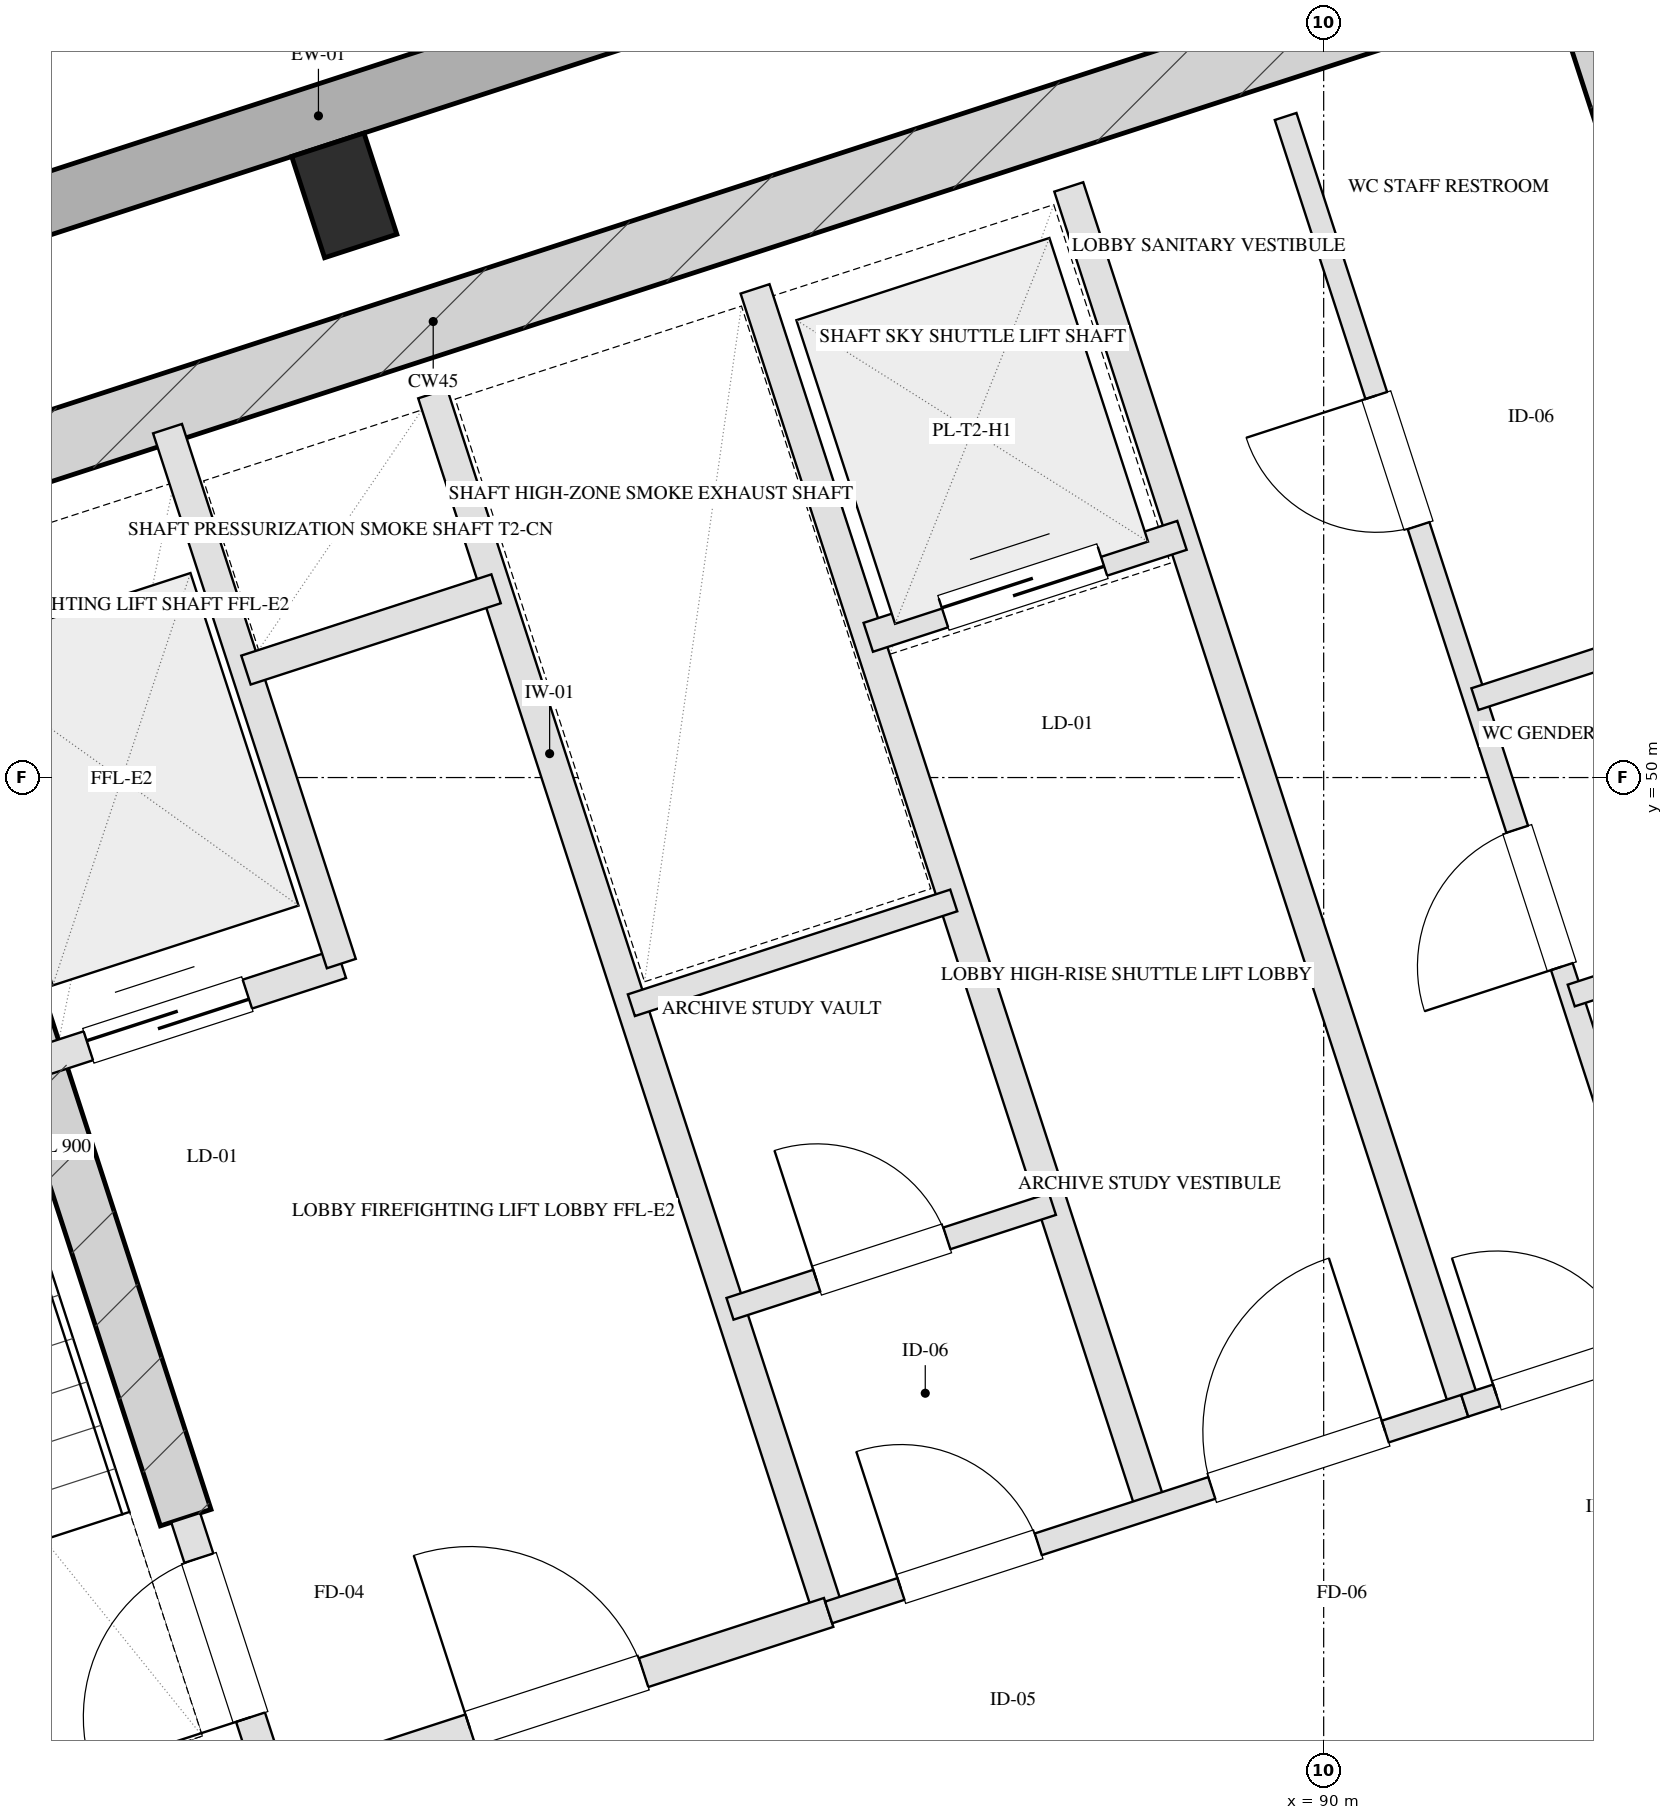
"""IFC4 building model, lengths in metres.
Left out: names, types, materials, properties, quantities, classifications, styles, units other than length and angle.
Written with IfcOpenShell. Run it as: python <this file> out.ifc"""

import sys

from ifc_helpers import new_model, si_unit, direction, frame, frame_2d, origin, origin_2d, place, context, subcontext, project, spatial, rectangle, hollow_rectangle, extrude, element, fill, save


model = new_model("IFC4")
c1 = context("Model", 3, precision=1e-05, world=origin(), true_north=direction((0.0, 1.0)))
c2 = subcontext(c1, "Body", "Model", "MODEL_VIEW")
j1 = project(units=[si_unit("LENGTHUNIT", "METRE"), si_unit("PLANEANGLEUNIT", "RADIAN")], contexts=[c1])
p1 = place(None, origin())
s1 = spatial("IfcSite", under=j1, at=p1, CompositionType="ELEMENT")
p2 = place(p1, origin())
s2 = spatial("IfcBuilding", under=s1, at=p2, CompositionType="ELEMENT")
p3 = place(p2, frame((0.0, 0.0, 223.1)))
s3 = spatial("IfcBuildingStorey", under=s2, at=p3, CompositionType="ELEMENT", Elevation=223.1)
p4 = place(p3, frame((76.415, 50.489, 0.0), z_axis=(0.0, 0.0, 1.0), x_axis=(0.951056810414, 0.309016089169, 0.0)))
e1 = element("IfcWall", 1, at=p4, inside=s3, PredefinedType="SHEAR", context=c2, shape_type="SweptSolid", body=[
    extrude(rectangle(XDim=16.25, YDim=0.45, at=frame_2d((8.125, 0.0))), origin(), (0.0, 0.0, 1.0), 3.45),
])
p5 = place(p3, frame((94.469, 46.781, 0.0), z_axis=(0.0, 0.0, 1.0), x_axis=(-0.309004419953, 0.951060601881, 0.0)))
e2 = element("IfcWall", 2, at=p5, inside=s3, PredefinedType="SHEAR", context=c2, shape_type="SweptSolid", body=[
    extrude(rectangle(XDim=9.33, YDim=0.45, at=frame_2d((4.665, 0.0))), origin(), (0.0, 0.0, 1.0), 3.45),
])
p6 = place(p3, frame((82.514, 45.131, 0.0), z_axis=(0.0, 0.0, 1.0), x_axis=(-0.308988790936, 0.951065679686, 0.0)))
e3 = element("IfcWall", 3, at=p6, inside=s3, PredefinedType="SHEAR", context=c2, shape_type="SweptSolid", body=[
    extrude(rectangle(XDim=6.98, YDim=0.35, at=frame_2d((3.49, 0.0))), origin(), (0.0, 0.0, 1.0), 3.45),
])
p7 = place(p3, frame((83.557, 53.83, 0.0), z_axis=(0.0, 0.0, 1.0), x_axis=(0.951056516295, 0.309016994375, 0.0)))
e4 = element("IfcColumn", 4, at=p7, inside=s3, PredefinedType="COLUMN", context=c2, shape_type="SweptSolid", body=[
    extrude(hollow_rectangle(XDim=0.5, YDim=0.7, WallThickness=0.025, at=origin_2d()), origin(), (0.0, 0.0, 1.0), 3.451),
])
p8 = place(p3, frame((82.618, 11.414, 0.0), z_axis=(0.0, 0.0, 1.0), x_axis=(-0.309016491071, 0.951056679828, 0.0)))
e5 = element("IfcWall", 5, at=p8, inside=s3, PredefinedType="SOLIDWALL", context=c2, shape_type="SweptSolid", body=[
    extrude(rectangle(XDim=38.4, YDim=0.4, at=frame_2d((19.2, 0.0))), origin(), (0.0, 0.0, 1.0), 2.61),
])
p9 = place(p8, frame((11.75, 0.0, 0.75)))
e6 = element("IfcOpeningElement", 6, at=p9, cuts=e5, PredefinedType="OPENING", context=c2, shape_type="SweptSolid", body=[
    extrude(rectangle(XDim=2.1, YDim=1.46, at=frame_2d((1.05, 0.73))), frame((0.0, 0.21, 0.0), z_axis=(0.0, -1.0, 0.0), x_axis=(1.0, 0.0, 0.0)), (0.0, 0.0, 1.0), 0.42),
])
p10 = place(p8, frame((15.55, 0.0, 0.75)))
e7 = element("IfcOpeningElement", 7, at=p10, cuts=e5, PredefinedType="OPENING", context=c2, shape_type="SweptSolid", body=[
    extrude(rectangle(XDim=2.1, YDim=1.46, at=frame_2d((1.05, 0.73))), frame((0.0, 0.21, 0.0), z_axis=(0.0, -1.0, 0.0), x_axis=(1.0, 0.0, 0.0)), (0.0, 0.0, 1.0), 0.42),
])
p11 = place(p8, frame((20.75, 0.0, 0.75)))
e8 = element("IfcOpeningElement", 8, at=p11, cuts=e5, PredefinedType="OPENING", context=c2, shape_type="SweptSolid", body=[
    extrude(rectangle(XDim=2.1, YDim=1.46, at=frame_2d((1.05, 0.73))), frame((0.0, 0.21, 0.0), z_axis=(0.0, -1.0, 0.0), x_axis=(1.0, 0.0, 0.0)), (0.0, 0.0, 1.0), 0.42),
])
p12 = place(p8, frame((24.55, 0.0, 0.75)))
e9 = element("IfcOpeningElement", 9, at=p12, cuts=e5, PredefinedType="OPENING", context=c2, shape_type="SweptSolid", body=[
    extrude(rectangle(XDim=2.1, YDim=1.46, at=frame_2d((1.05, 0.73))), frame((0.0, 0.21, 0.0), z_axis=(0.0, -1.0, 0.0), x_axis=(1.0, 0.0, 0.0)), (0.0, 0.0, 1.0), 0.42),
])
p13 = place(p3, frame((72.165, 50.706, 0.0), z_axis=(0.0, 0.0, 1.0), x_axis=(0.951058012937, 0.309012388148, 0.0)))
e10 = element("IfcWall", 10, at=p13, inside=s3, PredefinedType="SOLIDWALL", context=c2, shape_type="SweptSolid", body=[
    extrude(rectangle(XDim=23.6, YDim=0.4, at=frame_2d((11.8, 0.0))), origin(), (0.0, 0.0, 1.0), 2.61),
])
p14 = place(p3, frame((83.101, 43.324, 0.0), z_axis=(0.0, 0.0, 1.0), x_axis=(-0.309048298632, 0.951046344356, 0.0)))
e11 = element("IfcWall", 11, at=p14, inside=s3, PredefinedType="PARTITIONING", context=c2, shape_type="SweptSolid", body=[
    extrude(rectangle(XDim=1.9, YDim=0.2, at=frame_2d((0.95, 0.0))), origin(), (0.0, 0.0, 1.0), 3.175),
])
p15 = place(p14, frame((0.52, 0.0, 0.0)))
e12 = element("IfcOpeningElement", 12, at=p15, cuts=e11, PredefinedType="OPENING", context=c2, shape_type="SweptSolid", body=[
    extrude(rectangle(XDim=1.1, YDim=2.05, at=frame_2d((0.55, 1.025))), frame((0.0, 0.11, 0.0), z_axis=(0.0, -1.0, 0.0), x_axis=(1.0, 0.0, 0.0)), (0.0, 0.0, 1.0), 0.22),
])
p16 = place(p3, frame((86.743, 44.508, 0.0), z_axis=(0.0, 0.0, 1.0), x_axis=(-0.309016001439, 0.951056838919, 0.0)))
e13 = element("IfcWall", 13, at=p16, inside=s3, PredefinedType="PARTITIONING", context=c2, shape_type="SweptSolid", body=[
    extrude(rectangle(XDim=8.43, YDim=0.2, at=frame_2d((4.215, 0.0))), origin(), (0.0, 0.0, 1.0), 3.175),
])
p17 = place(p3, frame((83.101, 43.324, 0.0), z_axis=(0.0, 0.0, 1.0), x_axis=(0.951052804469, 0.309028417967, 0.0)))
e14 = element("IfcWall", 14, at=p17, inside=s3, PredefinedType="PARTITIONING", context=c2, shape_type="SweptSolid", body=[
    extrude(rectangle(XDim=3.83, YDim=0.2, at=frame_2d((1.915, 0.0))), origin(), (0.0, 0.0, 1.0), 3.175),
])
p18 = place(p17, frame((1.35, 0.0, 0.0)))
e15 = element("IfcOpeningElement", 15, at=p18, cuts=e14, PredefinedType="OPENING", context=c2, shape_type="SweptSolid", body=[
    extrude(rectangle(XDim=1.2, YDim=2.05, at=frame_2d((0.6, 1.025))), frame((0.0, 0.11, 0.0), z_axis=(0.0, -1.0, 0.0), x_axis=(1.0, 0.0, 0.0)), (0.0, 0.0, 1.0), 0.22),
])
p19 = place(p3, frame((81.54, 48.127, 0.0), z_axis=(0.0, 0.0, 1.0), x_axis=(0.951062257173, 0.308999325213, 0.0)))
e16 = element("IfcWall", 16, at=p19, inside=s3, PredefinedType="PARTITIONING", context=c2, shape_type="SweptSolid", body=[
    extrude(rectangle(XDim=2.1, YDim=0.2, at=frame_2d((1.05, 0.0))), origin(), (0.0, 0.0, 1.0), 3.175),
])
p20 = place(p19, frame((0.35, 0.0, 0.0)))
e17 = element("IfcOpeningElement", 17, at=p20, cuts=e16, PredefinedType="OPENING", context=c2, shape_type="SweptSolid", body=[
    extrude(rectangle(XDim=1.1, YDim=2.05, at=frame_2d((0.55, 1.025))), frame((0.0, 0.11, 0.0), z_axis=(0.0, -1.0, 0.0), x_axis=(1.0, 0.0, 0.0)), (0.0, 0.0, 1.0), 0.22),
])
p21 = place(p3, frame((83.538, 48.776, 0.0), z_axis=(0.0, 0.0, 1.0), x_axis=(-0.3089935693, 0.951064127245, 0.0)))
e18 = element("IfcWall", 18, at=p21, inside=s3, PredefinedType="PARTITIONING", context=c2, shape_type="SweptSolid", body=[
    extrude(rectangle(XDim=3.7, YDim=0.2, at=frame_2d((1.85, 0.0))), origin(), (0.0, 0.0, 1.0), 3.175),
])
p22 = place(p3, frame((82.91, 50.707, 0.0), z_axis=(0.0, 0.0, 1.0), x_axis=(0.951041328149, 0.309063734775, 0.0)))
e19 = element("IfcWall", 19, at=p22, inside=s3, PredefinedType="PARTITIONING", context=c2, shape_type="SweptSolid", body=[
    extrude(rectangle(XDim=1.73, YDim=0.2, at=frame_2d((0.865, 0.0))), origin(), (0.0, 0.0, 1.0), 3.175),
])
p23 = place(p3, frame((90.928, 45.868, 0.0), z_axis=(0.0, 0.0, 1.0), x_axis=(-0.309042196757, 0.951048327176, 0.0)))
e20 = element("IfcWall", 20, at=p23, inside=s3, PredefinedType="PARTITIONING", context=c2, shape_type="SweptSolid", body=[
    extrude(rectangle(XDim=8.43, YDim=0.2, at=frame_2d((4.215, 0.0))), origin(), (0.0, 0.0, 1.0), 3.175),
])
p24 = place(p3, frame((88.864, 45.197, 0.0), z_axis=(0.0, 0.0, 1.0), x_axis=(-0.309007490203, 0.951059604335, 0.0)))
e21 = element("IfcWall", 21, at=p24, inside=s3, PredefinedType="PARTITIONING", context=c2, shape_type="SweptSolid", body=[
    extrude(rectangle(XDim=8.43, YDim=0.2, at=frame_2d((4.215, 0.0))), origin(), (0.0, 0.0, 1.0), 3.175),
])
p25 = place(p3, frame((86.743, 44.508, 0.0), z_axis=(0.0, 0.0, 1.0), x_axis=(0.951063829732, 0.308994485023, 0.0)))
e22 = element("IfcWall", 22, at=p25, inside=s3, PredefinedType="PARTITIONING", context=c2, shape_type="SweptSolid", body=[
    extrude(rectangle(XDim=4.4, YDim=0.15, at=frame_2d((2.2, 0.0))), origin(), (0.0, 0.0, 1.0), 3.175),
])
p26 = place(p25, frame((0.5, 0.0, 0.0)))
e23 = element("IfcOpeningElement", 23, at=p26, cuts=e22, PredefinedType="OPENING", context=c2, shape_type="SweptSolid", body=[
    extrude(rectangle(XDim=0.95, YDim=2.05, at=frame_2d((0.475, 1.025))), frame((0.0, 0.085, 0.0), z_axis=(0.0, -1.0, 0.0), x_axis=(1.0, 0.0, 0.0)), (0.0, 0.0, 1.0), 0.17),
])
p27 = place(p25, frame((2.65, 0.0, 0.0)))
e24 = element("IfcOpeningElement", 24, at=p27, cuts=e22, PredefinedType="OPENING", context=c2, shape_type="SweptSolid", body=[
    extrude(rectangle(XDim=1.2, YDim=2.05, at=frame_2d((0.6, 1.025))), frame((0.0, 0.085, 0.0), z_axis=(0.0, -1.0, 0.0), x_axis=(1.0, 0.0, 0.0)), (0.0, 0.0, 1.0), 0.17),
])
p28 = place(p3, frame((85.446, 48.502, 0.0), z_axis=(0.0, 0.0, 1.0), x_axis=(0.951075093106, 0.308959814982, 0.0)))
e25 = element("IfcWall", 25, at=p28, inside=s3, PredefinedType="PARTITIONING", context=c2, shape_type="SweptSolid", body=[
    extrude(rectangle(XDim=2.23, YDim=0.15, at=frame_2d((1.115, 0.0))), origin(), (0.0, 0.0, 1.0), 3.175),
])
p29 = place(p3, frame((86.094, 46.505, 0.0), z_axis=(0.0, 0.0, 1.0), x_axis=(0.951042918244, 0.309058841741, 0.0)))
e26 = element("IfcWall", 26, at=p29, inside=s3, PredefinedType="PARTITIONING", context=c2, shape_type="SweptSolid", body=[
    extrude(rectangle(XDim=2.23, YDim=0.15, at=frame_2d((1.115, 0.0))), origin(), (0.0, 0.0, 1.0), 3.175),
])
p30 = place(p29, frame((0.6, 0.0, 0.0)))
e27 = element("IfcOpeningElement", 27, at=p30, cuts=e26, PredefinedType="OPENING", context=c2, shape_type="SweptSolid", body=[
    extrude(rectangle(XDim=0.9, YDim=2.05, at=frame_2d((0.45, 1.025))), frame((0.0, 0.085, 0.0), z_axis=(0.0, -1.0, 0.0), x_axis=(1.0, 0.0, 0.0)), (0.0, 0.0, 1.0), 0.17),
])
p31 = place(p3, frame((87.004, 50.922, 0.0), z_axis=(0.0, 0.0, 1.0), x_axis=(0.951041509718, 0.309063176055, 0.0)))
e28 = element("IfcWall", 28, at=p31, inside=s3, PredefinedType="PARTITIONING", context=c2, shape_type="SweptSolid", body=[
    extrude(rectangle(XDim=2.17, YDim=0.2, at=frame_2d((1.085, 0.0))), origin(), (0.0, 0.0, 1.0), 3.175),
])
p32 = place(p31, frame((0.52, 0.0, 0.0)))
e29 = element("IfcOpeningElement", 29, at=p32, cuts=e28, PredefinedType="OPENING", context=c2, shape_type="SweptSolid", body=[
    extrude(rectangle(XDim=1.1, YDim=2.05, at=frame_2d((0.55, 1.025))), frame((0.0, 0.11, 0.0), z_axis=(0.0, -1.0, 0.0), x_axis=(1.0, 0.0, 0.0)), (0.0, 0.0, 1.0), 0.22),
])
p33 = place(p3, frame((90.928, 45.868, 0.0), z_axis=(0.0, 0.0, 1.0), x_axis=(0.951059297078, 0.309008435874, 0.0)))
e30 = element("IfcWall", 30, at=p33, inside=s3, PredefinedType="PARTITIONING", context=c2, shape_type="SweptSolid", body=[
    extrude(rectangle(XDim=3.2, YDim=0.15, at=frame_2d((1.6, 0.0))), origin(), (0.0, 0.0, 1.0), 3.175),
])
p34 = place(p33, frame((0.22, 0.0, 0.0)))
e31 = element("IfcOpeningElement", 31, at=p34, cuts=e30, PredefinedType="OPENING", context=c2, shape_type="SweptSolid", body=[
    extrude(rectangle(XDim=0.95, YDim=2.05, at=frame_2d((0.475, 1.025))), frame((0.0, 0.085, 0.0), z_axis=(0.0, -1.0, 0.0), x_axis=(1.0, 0.0, 0.0)), (0.0, 0.0, 1.0), 0.17),
])
p35 = place(p33, frame((1.95, 0.0, 0.0)))
e32 = element("IfcOpeningElement", 32, at=p35, cuts=e30, PredefinedType="OPENING", context=c2, shape_type="SweptSolid", body=[
    extrude(rectangle(XDim=0.9, YDim=2.05, at=frame_2d((0.45, 1.025))), frame((0.0, 0.085, 0.0), z_axis=(0.0, -1.0, 0.0), x_axis=(1.0, 0.0, 0.0)), (0.0, 0.0, 1.0), 0.17),
])
p36 = place(p3, frame((92.355, 46.331, 0.0), z_axis=(0.0, 0.0, 1.0), x_axis=(-0.309007490203, 0.951059604335, 0.0)))
e33 = element("IfcWall", 33, at=p36, inside=s3, PredefinedType="PARTITIONING", context=c2, shape_type="SweptSolid", body=[
    extrude(rectangle(XDim=8.43, YDim=0.15, at=frame_2d((4.215, 0.0))), origin(), (0.0, 0.0, 1.0), 3.175),
])
p37 = place(p36, frame((2.55, 0.0, 0.0)))
e34 = element("IfcOpeningElement", 34, at=p37, cuts=e33, PredefinedType="OPENING", context=c2, shape_type="SweptSolid", body=[
    extrude(rectangle(XDim=0.95, YDim=2.05, at=frame_2d((0.475, 1.025))), frame((0.0, 0.085, 0.0), z_axis=(0.0, -1.0, 0.0), x_axis=(1.0, 0.0, 0.0)), (0.0, 0.0, 1.0), 0.17),
])
p38 = place(p36, frame((5.6, 0.0, 0.0)))
e35 = element("IfcOpeningElement", 35, at=p38, cuts=e33, PredefinedType="OPENING", context=c2, shape_type="SweptSolid", body=[
    extrude(rectangle(XDim=0.9, YDim=2.05, at=frame_2d((0.45, 1.025))), frame((0.0, 0.085, 0.0), z_axis=(0.0, -1.0, 0.0), x_axis=(1.0, 0.0, 0.0)), (0.0, 0.0, 1.0), 0.17),
])
p39 = place(p3, frame((90.995, 50.516, 0.0), z_axis=(0.0, 0.0, 1.0), x_axis=(0.951040401051, 0.309066587596, 0.0)))
e36 = element("IfcWall", 36, at=p39, inside=s3, PredefinedType="PARTITIONING", context=c2, shape_type="SweptSolid", body=[
    extrude(rectangle(XDim=1.7, YDim=0.15, at=frame_2d((0.85, 0.0))), origin(), (0.0, 0.0, 1.0), 3.175),
])
p40 = place(p3, frame((91.628, 48.566, 0.0), z_axis=(0.0, 0.0, 1.0), x_axis=(0.951054116971, 0.309024378638, 0.0)))
e37 = element("IfcWall", 37, at=p40, inside=s3, PredefinedType="PARTITIONING", context=c2, shape_type="SweptSolid", body=[
    extrude(rectangle(XDim=1.7, YDim=0.15, at=frame_2d((0.85, 0.0))), origin(), (0.0, 0.0, 1.0), 3.175),
])
p41 = place(p15, origin())
e38 = element("IfcDoor", 38, at=p41, inside=s3, OperationType="SINGLE_SWING_LEFT", PredefinedType="DOOR", context=c2, shape_type="SweptSolid", body=[
    extrude(rectangle(XDim=1.1, YDim=2.05, at=frame_2d((0.55, 1.025))), frame((0.0, 0.025, 0.0), z_axis=(0.0, -1.0, 0.0), x_axis=(1.0, 0.0, 0.0)), (0.0, 0.0, 1.0), 0.05),
])
fill(e12, e38)
p42 = place(p18, origin())
e39 = element("IfcDoor", 39, at=p42, inside=s3, OperationType="SINGLE_SWING_LEFT", PredefinedType="DOOR", context=c2, shape_type="SweptSolid", body=[
    extrude(rectangle(XDim=1.2, YDim=2.05, at=frame_2d((0.6, 1.025))), frame((0.0, 0.025, 0.0), z_axis=(0.0, -1.0, 0.0), x_axis=(1.0, 0.0, 0.0)), (0.0, 0.0, 1.0), 0.05),
])
fill(e15, e39)
p43 = place(p20, origin())
e40 = element("IfcDoor", 40, at=p43, inside=s3, OperationType="DOUBLE_DOOR_SLIDING", PredefinedType="DOOR", context=c2, shape_type="SweptSolid", body=[
    extrude(rectangle(XDim=1.1, YDim=2.05, at=frame_2d((0.55, 1.025))), frame((0.0, 0.025, 0.0), z_axis=(0.0, -1.0, 0.0), x_axis=(1.0, 0.0, 0.0)), (0.0, 0.0, 1.0), 0.05),
])
fill(e17, e40)
p44 = place(p26, origin())
e41 = element("IfcDoor", 41, at=p44, inside=s3, OperationType="SINGLE_SWING_LEFT", PredefinedType="DOOR", context=c2, shape_type="SweptSolid", body=[
    extrude(rectangle(XDim=0.95, YDim=2.05, at=frame_2d((0.475, 1.025))), frame((0.0, 0.025, 0.0), z_axis=(0.0, -1.0, 0.0), x_axis=(1.0, 0.0, 0.0)), (0.0, 0.0, 1.0), 0.05),
])
fill(e23, e41)
p45 = place(p27, origin())
e42 = element("IfcDoor", 42, at=p45, inside=s3, OperationType="SINGLE_SWING_RIGHT", PredefinedType="DOOR", context=c2, shape_type="SweptSolid", body=[
    extrude(rectangle(XDim=1.2, YDim=2.05, at=frame_2d((0.6, 1.025))), frame((0.0, 0.025, 0.0), z_axis=(0.0, -1.0, 0.0), x_axis=(1.0, 0.0, 0.0)), (0.0, 0.0, 1.0), 0.05),
])
fill(e24, e42)
p46 = place(p30, origin())
e43 = element("IfcDoor", 43, at=p46, inside=s3, OperationType="SINGLE_SWING_LEFT", PredefinedType="DOOR", context=c2, shape_type="SweptSolid", body=[
    extrude(rectangle(XDim=0.9, YDim=2.05, at=frame_2d((0.45, 1.025))), frame((0.0, 0.025, 0.0), z_axis=(0.0, -1.0, 0.0), x_axis=(1.0, 0.0, 0.0)), (0.0, 0.0, 1.0), 0.05),
])
fill(e27, e43)
p47 = place(p32, origin())
e44 = element("IfcDoor", 44, at=p47, inside=s3, OperationType="DOUBLE_DOOR_SLIDING", PredefinedType="DOOR", context=c2, shape_type="SweptSolid", body=[
    extrude(rectangle(XDim=1.1, YDim=2.05, at=frame_2d((0.55, 1.025))), frame((0.0, 0.025, 0.0), z_axis=(0.0, -1.0, 0.0), x_axis=(1.0, 0.0, 0.0)), (0.0, 0.0, 1.0), 0.05),
])
fill(e29, e44)
p48 = place(p34, origin())
e45 = element("IfcDoor", 45, at=p48, inside=s3, OperationType="SINGLE_SWING_LEFT", PredefinedType="DOOR", context=c2, shape_type="SweptSolid", body=[
    extrude(rectangle(XDim=0.95, YDim=2.05, at=frame_2d((0.475, 1.025))), frame((0.0, 0.025, 0.0), z_axis=(0.0, -1.0, 0.0), x_axis=(1.0, 0.0, 0.0)), (0.0, 0.0, 1.0), 0.05),
])
fill(e31, e45)
p49 = place(p37, origin())
e46 = element("IfcDoor", 46, at=p49, inside=s3, OperationType="SINGLE_SWING_LEFT", PredefinedType="DOOR", context=c2, shape_type="SweptSolid", body=[
    extrude(rectangle(XDim=0.95, YDim=2.05, at=frame_2d((0.475, 1.025))), frame((0.0, 0.025, 0.0), z_axis=(0.0, -1.0, 0.0), x_axis=(1.0, 0.0, 0.0)), (0.0, 0.0, 1.0), 0.05),
])
fill(e34, e46)
p50 = place(p38, origin())
e47 = element("IfcDoor", 47, at=p50, inside=s3, OperationType="SINGLE_SWING_RIGHT", PredefinedType="DOOR", context=c2, shape_type="SweptSolid", body=[
    extrude(rectangle(XDim=0.9, YDim=2.05, at=frame_2d((0.45, 1.025))), frame((0.0, 0.025, 0.0), z_axis=(0.0, -1.0, 0.0), x_axis=(1.0, 0.0, 0.0)), (0.0, 0.0, 1.0), 0.05),
])
fill(e35, e47)
save(model, sys.argv[1])
